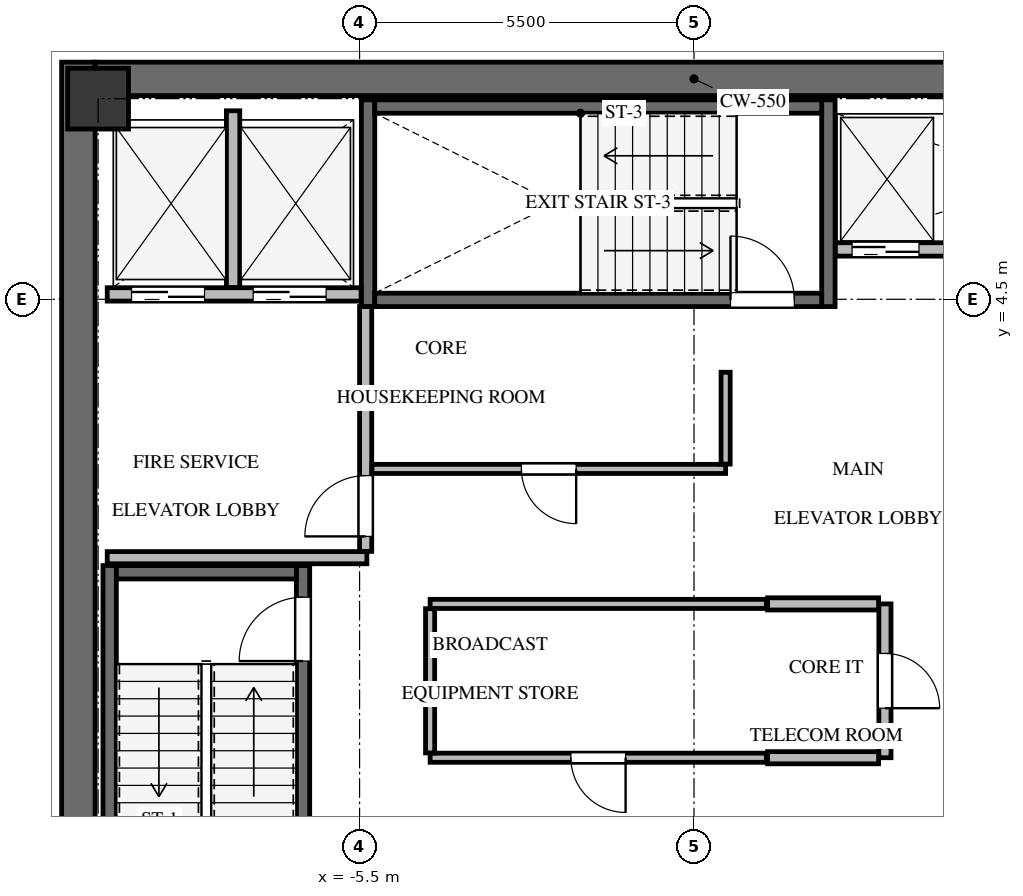
"""IFC4 building model, lengths in metres.
Left out: names, types, materials, properties, quantities, classifications, styles, units other than length and angle.
Written with IfcOpenShell. Run it as: python <this file> out.ifc"""

import sys

from ifc_helpers import new_model, si_unit, direction, frame, frame_2d, origin, origin_2d, place, context, subcontext, project, spatial, rectangle, extrude, source, transform, mapped, element, fill, save


model = new_model("IFC4")
c1 = context("Model", 3, precision=1e-05, world=origin(), true_north=direction((0.0, 1.0)))
c2 = subcontext(c1, "Body", "Model", "MODEL_VIEW")
j1 = project(units=[si_unit("LENGTHUNIT", "METRE"), si_unit("PLANEANGLEUNIT", "RADIAN")], contexts=[c1])
p1 = place(None, origin())
s1 = spatial("IfcSite", under=j1, at=p1, CompositionType="ELEMENT")
p2 = place(p1, origin())
s2 = spatial("IfcBuilding", under=s1, at=p2, CompositionType="ELEMENT")
p3 = place(p2, frame((0.0, 0.0, 238.1)))
s3 = spatial("IfcBuildingStorey", under=s2, at=p3, CompositionType="ELEMENT", Elevation=238.1)
p4 = place(p3, frame((-10.125, -8.4, 0.0), z_axis=(0.0, 0.0, 1.0), x_axis=(0.0, 1.0, 0.0)))
e1 = element("IfcWall", 1, at=p4, inside=s3, PredefinedType="SHEAR", context=c2, shape_type="SweptSolid", body=[
    extrude(rectangle(XDim=16.8, YDim=0.55, at=frame_2d((8.4, 0.0))), origin(), (0.0, 0.0, 1.0), 3.3),
])
p5 = place(p3, frame((-9.85, 8.125, 0.0), z_axis=(0.0, 0.0, 1.0), x_axis=(1.0, 0.0, 0.0)))
e2 = element("IfcWall", 2, at=p5, inside=s3, PredefinedType="SHEAR", context=c2, shape_type="SweptSolid", body=[
    extrude(rectangle(XDim=19.7, YDim=0.55, at=frame_2d((9.85, 0.0))), origin(), (0.0, 0.0, 1.0), 3.3),
])
p6 = place(p3, frame((-6.43, -7.77, -0.24), z_axis=(0.0, 0.0, 1.0), x_axis=(0.0, 1.0, 0.0)))
e3 = element("IfcWall", 3, at=p6, inside=s3, PredefinedType="SHEAR", context=c2, shape_type="SweptSolid", body=[
    extrude(rectangle(XDim=7.89, YDim=0.22, at=frame_2d((3.945, 0.0))), origin(), (0.0, 0.0, 1.0), 3.3),
])
p7 = place(p6, frame((6.32, 0.0, 0.0)))
e4 = element("IfcOpeningElement", 4, at=p7, cuts=e3, PredefinedType="OPENING", context=c2, shape_type="SweptSolid", body=[
    extrude(rectangle(XDim=1.05, YDim=2.15, at=frame_2d((0.525, 1.075))), frame((0.0, 0.12, 0.0), z_axis=(0.0, -1.0, 0.0), x_axis=(1.0, 0.0, 0.0)), (0.0, 0.0, 1.0), 0.24),
])
p8 = place(p3, frame((-9.61, 0.12, -0.24), z_axis=(0.0, 0.0, 1.0), x_axis=(0.0, -1.0, 0.0)))
e5 = element("IfcWall", 5, at=p8, inside=s3, PredefinedType="SHEAR", context=c2, shape_type="SweptSolid", body=[
    extrude(rectangle(XDim=7.89, YDim=0.22, at=frame_2d((3.945, 0.0))), origin(), (0.0, 0.0, 1.0), 3.3),
])
p9 = place(p3, frame((-6.54, 0.01, -0.24), z_axis=(0.0, 0.0, 1.0), x_axis=(-1.0, 0.0, 0.0)))
e6 = element("IfcWall", 6, at=p9, inside=s3, PredefinedType="SHEAR", context=c2, shape_type="SweptSolid", body=[
    extrude(rectangle(XDim=2.96, YDim=0.22, at=frame_2d((1.48, 0.0))), origin(), (0.0, 0.0, 1.0), 3.3),
])
for number, where, z_axis, x_axis in (
    (7, (2.21, 4.38, -0.24), (0.0, 0.0, 1.0), (0.0, 1.0, 0.0)),
    (8, (-5.36, 7.78, -0.24), (0.0, 0.0, 1.0), (0.0, -1.0, 0.0)),
):
    element("IfcWall", number, at=place(p3, frame(where, z_axis=z_axis, x_axis=x_axis)), inside=s3, PredefinedType="SHEAR", context=c2, shape_type="SweptSolid", body=[
        extrude(rectangle(XDim=3.4, YDim=0.22, at=frame_2d((1.7, 0.0))), origin(), (0.0, 0.0, 1.0), 3.3),
    ])
p10 = place(p3, frame((-5.25, 4.49, -0.24), z_axis=(0.0, 0.0, 1.0), x_axis=(1.0, 0.0, 0.0)))
e9 = element("IfcWall", 9, at=p10, inside=s3, PredefinedType="SHEAR", context=c2, shape_type="SweptSolid", body=[
    extrude(rectangle(XDim=7.35, YDim=0.22, at=frame_2d((3.675, 0.0))), origin(), (0.0, 0.0, 1.0), 3.3),
])
p11 = place(p10, frame((5.85, 0.0, 0.0)))
e10 = element("IfcOpeningElement", 10, at=p11, cuts=e9, PredefinedType="OPENING", context=c2, shape_type="SweptSolid", body=[
    extrude(rectangle(XDim=1.05, YDim=2.15, at=frame_2d((0.525, 1.075))), frame((0.0, 0.12, 0.0), z_axis=(0.0, -1.0, 0.0), x_axis=(1.0, 0.0, 0.0)), (0.0, 0.0, 1.0), 0.24),
])
p12 = place(p3, frame((2.1, 7.67, -0.24), z_axis=(0.0, 0.0, 1.0), x_axis=(-1.0, 0.0, 0.0)))
e11 = element("IfcWall", 11, at=p12, inside=s3, PredefinedType="SHEAR", context=c2, shape_type="SweptSolid", body=[
    extrude(rectangle(XDim=7.35, YDim=0.22, at=frame_2d((3.675, 0.0))), origin(), (0.0, 0.0, 1.0), 3.3),
])
m1 = source(origin(), c2, "Body", "SweptSolid", [
    extrude(rectangle(XDim=1.0, YDim=1.0, at=origin_2d()), origin(), (0.0, 0.0, 1.0), 3.3),
])
p13 = place(p3, frame((-9.8, 7.8, -0.24), z_axis=(0.0, 0.0, 1.0), x_axis=(1.0, 0.0, 0.0)))
e12 = element("IfcColumn", 12, at=p13, inside=s3, PredefinedType="COLUMN", context=c2, shape_type="MappedRepresentation", body=[
    mapped(m1, transform((0.0, 0.0, 0.0), x_axis=(1.0, 0.0, 0.0), y_axis=(0.0, 1.0, 0.0), z_axis=(0.0, 0.0, 1.0), scale=1.0)),
])
p14 = place(p3, frame((-9.65, 4.58, 0.0), z_axis=(0.0, 0.0, 1.0), x_axis=(1.0, 0.0, 0.0)))
e13 = element("IfcWall", 13, at=p14, inside=s3, PredefinedType="SOLIDWALL", context=c2, shape_type="SweptSolid", body=[
    extrude(rectangle(XDim=4.175, YDim=0.22, at=frame_2d((2.087, 0.0))), origin(), (0.0, 0.0, 1.0), 3.045),
])
p15 = place(p14, frame((0.4, 0.0, 0.0)))
e14 = element("IfcOpeningElement", 14, at=p15, cuts=e13, PredefinedType="OPENING", context=c2, shape_type="SweptSolid", body=[
    extrude(rectangle(XDim=1.2, YDim=2.15, at=frame_2d((0.6, 1.075))), frame((0.0, 0.12, 0.0), z_axis=(0.0, -1.0, 0.0), x_axis=(1.0, 0.0, 0.0)), (0.0, 0.0, 1.0), 0.24),
])
p16 = place(p14, frame((2.4, 0.0, 0.0)))
e15 = element("IfcOpeningElement", 15, at=p16, cuts=e13, PredefinedType="OPENING", context=c2, shape_type="SweptSolid", body=[
    extrude(rectangle(XDim=1.2, YDim=2.15, at=frame_2d((0.6, 1.075))), frame((0.0, 0.12, 0.0), z_axis=(0.0, -1.0, 0.0), x_axis=(1.0, 0.0, 0.0)), (0.0, 0.0, 1.0), 0.24),
])
p17 = place(p3, frame((-7.58, 4.694, 0.0), z_axis=(0.0, 0.0, 1.0), x_axis=(0.0, 1.0, 0.0)))
e16 = element("IfcWall", 16, at=p17, inside=s3, PredefinedType="SOLIDWALL", context=c2, shape_type="SweptSolid", body=[
    extrude(rectangle(XDim=2.906, YDim=0.22, at=frame_2d((1.453, 0.0))), origin(), (0.0, 0.0, 1.0), 3.045),
])
p18 = place(p3, frame((-9.65, 0.25, 0.0), z_axis=(0.0, 0.0, 1.0), x_axis=(1.0, 0.0, 0.0)))
e17 = element("IfcWall", 17, at=p18, inside=s3, PredefinedType="SOLIDWALL", context=c2, shape_type="SweptSolid", body=[
    extrude(rectangle(XDim=4.27, YDim=0.2, at=frame_2d((2.135, 0.0))), origin(), (0.0, 0.0, 1.0), 3.045),
])
p19 = place(p3, frame((-5.4, 0.354, 0.0), z_axis=(0.0, 0.0, 1.0), x_axis=(0.0, 1.0, 0.0)))
e18 = element("IfcWall", 18, at=p19, inside=s3, PredefinedType="SOLIDWALL", context=c2, shape_type="SweptSolid", body=[
    extrude(rectangle(XDim=4.026, YDim=0.2, at=frame_2d((2.013, 0.0))), origin(), (0.0, 0.0, 1.0), 3.045),
])
p20 = place(p19, frame((0.246, 0.0, 0.0)))
e19 = element("IfcOpeningElement", 19, at=p20, cuts=e18, PredefinedType="OPENING", context=c2, shape_type="SweptSolid", body=[
    extrude(rectangle(XDim=1.0, YDim=2.15, at=frame_2d((0.5, 1.075))), frame((0.0, 0.11, 0.0), z_axis=(0.0, -1.0, 0.0), x_axis=(1.0, 0.0, 0.0)), (0.0, 0.0, 1.0), 0.22),
])
p21 = place(p3, frame((2.325, 5.32, 0.0), z_axis=(0.0, 0.0, 1.0), x_axis=(1.0, 0.0, 0.0)))
e20 = element("IfcWall", 20, at=p21, inside=s3, PredefinedType="SOLIDWALL", context=c2, shape_type="SweptSolid", body=[
    extrude(rectangle(XDim=7.325, YDim=0.22, at=frame_2d((3.663, 0.0))), origin(), (0.0, 0.0, 1.0), 3.045),
])
p22 = place(p21, frame((0.275, 0.0, 0.0)))
e21 = element("IfcOpeningElement", 21, at=p22, cuts=e20, PredefinedType="OPENING", context=c2, shape_type="SweptSolid", body=[
    extrude(rectangle(XDim=1.1, YDim=2.15, at=frame_2d((0.55, 1.075))), frame((0.0, 0.12, 0.0), z_axis=(0.0, -1.0, 0.0), x_axis=(1.0, 0.0, 0.0)), (0.0, 0.0, 1.0), 0.24),
])
p23 = place(p21, frame((2.045, 0.0, 0.0)))
e22 = element("IfcOpeningElement", 22, at=p23, cuts=e20, PredefinedType="OPENING", context=c2, shape_type="SweptSolid", body=[
    extrude(rectangle(XDim=1.1, YDim=2.15, at=frame_2d((0.55, 1.075))), frame((0.0, 0.12, 0.0), z_axis=(0.0, -1.0, 0.0), x_axis=(1.0, 0.0, 0.0)), (0.0, 0.0, 1.0), 0.24),
])
p24 = place(p21, frame((3.815, 0.0, 0.0)))
e23 = element("IfcOpeningElement", 23, at=p24, cuts=e20, PredefinedType="OPENING", context=c2, shape_type="SweptSolid", body=[
    extrude(rectangle(XDim=1.1, YDim=2.15, at=frame_2d((0.55, 1.075))), frame((0.0, 0.12, 0.0), z_axis=(0.0, -1.0, 0.0), x_axis=(1.0, 0.0, 0.0)), (0.0, 0.0, 1.0), 0.24),
])
p25 = place(p21, frame((5.585, 0.0, 0.0)))
e24 = element("IfcOpeningElement", 24, at=p25, cuts=e20, PredefinedType="OPENING", context=c2, shape_type="SweptSolid", body=[
    extrude(rectangle(XDim=1.1, YDim=2.15, at=frame_2d((0.55, 1.075))), frame((0.0, 0.12, 0.0), z_axis=(0.0, -1.0, 0.0), x_axis=(1.0, 0.0, 0.0)), (0.0, 0.0, 1.0), 0.24),
])
p26 = place(p3, frame((1.19, -3.04, 0.0), z_axis=(0.0, 0.0, 1.0), x_axis=(-1.0, 0.0, 0.0)))
e25 = element("IfcWall", 25, at=p26, inside=s3, PredefinedType="PARTITIONING", context=c2, shape_type="SweptSolid", body=[
    extrude(rectangle(XDim=5.53, YDim=0.15, at=frame_2d((2.765, 0.0))), origin(), (0.0, 0.0, 1.0), 3.045),
])
p27 = place(p26, frame((2.315, 0.0, 0.0)))
e26 = element("IfcOpeningElement", 26, at=p27, cuts=e25, PredefinedType="OPENING", context=c2, shape_type="SweptSolid", body=[
    extrude(rectangle(XDim=0.9, YDim=2.05, at=frame_2d((0.45, 1.025))), frame((0.0, 0.085, 0.0), z_axis=(0.0, -1.0, 0.0), x_axis=(1.0, 0.0, 0.0)), (0.0, 0.0, 1.0), 0.17),
])
p28 = place(p3, frame((-4.34, -0.51, 0.0), z_axis=(0.0, 0.0, 1.0), x_axis=(1.0, 0.0, 0.0)))
e27 = element("IfcWall", 27, at=p28, inside=s3, PredefinedType="PARTITIONING", context=c2, shape_type="SweptSolid", body=[
    extrude(rectangle(XDim=5.53, YDim=0.15, at=frame_2d((2.765, 0.0))), origin(), (0.0, 0.0, 1.0), 3.045),
])
p29 = place(p3, frame((-4.34, -2.961, 0.0), z_axis=(0.0, 0.0, 1.0), x_axis=(0.0, 1.0, 0.0)))
e28 = element("IfcWall", 28, at=p29, inside=s3, PredefinedType="PARTITIONING", context=c2, shape_type="SweptSolid", body=[
    extrude(rectangle(XDim=2.372, YDim=0.15, at=frame_2d((1.186, 0.0))), origin(), (0.0, 0.0, 1.0), 3.045),
])
p30 = place(p3, frame((3.14, -0.51, 0.0), z_axis=(0.0, 0.0, 1.0), x_axis=(0.0, -1.0, 0.0)))
e29 = element("IfcWall", 29, at=p30, inside=s3, PredefinedType="SOLIDWALL", context=c2, shape_type="SweptSolid", body=[
    extrude(rectangle(XDim=2.53, YDim=0.2, at=frame_2d((1.265, 0.0))), origin(), (0.0, 0.0, 1.0), 3.045),
])
p31 = place(p30, frame((0.815, 0.0, 0.0)))
e30 = element("IfcOpeningElement", 30, at=p31, cuts=e29, PredefinedType="OPENING", context=c2, shape_type="SweptSolid", body=[
    extrude(rectangle(XDim=0.9, YDim=2.05, at=frame_2d((0.45, 1.025))), frame((0.0, 0.11, 0.0), z_axis=(0.0, -1.0, 0.0), x_axis=(1.0, 0.0, 0.0)), (0.0, 0.0, 1.0), 0.22),
])
for number, where, z_axis, x_axis in (
    (31, (3.036, -3.04, 0.0), (0.0, 0.0, 1.0), (-1.0, 0.0, 0.0)),
    (32, (1.21, -0.51, 0.0), (0.0, 0.0, 1.0), (1.0, 0.0, 0.0)),
):
    element("IfcWall", number, at=place(p3, frame(where, z_axis=z_axis, x_axis=x_axis)), inside=s3, PredefinedType="SOLIDWALL", context=c2, shape_type="SweptSolid", body=[
        extrude(rectangle(XDim=1.826, YDim=0.2, at=frame_2d((0.913, 0.0))), origin(), (0.0, 0.0, 1.0), 3.045),
    ])
p32 = place(p3, frame((0.52, 1.71, 0.0), z_axis=(0.0, 0.0, 1.0), x_axis=(-1.0, 0.0, 0.0)))
e33 = element("IfcWall", 33, at=p32, inside=s3, PredefinedType="PARTITIONING", context=c2, shape_type="SweptSolid", body=[
    extrude(rectangle(XDim=5.816, YDim=0.15, at=frame_2d((2.908, 0.0))), origin(), (0.0, 0.0, 1.0), 3.045),
])
p33 = place(p32, frame((2.458, 0.0, 0.0)))
e34 = element("IfcOpeningElement", 34, at=p33, cuts=e33, PredefinedType="OPENING", context=c2, shape_type="SweptSolid", body=[
    extrude(rectangle(XDim=0.9, YDim=2.05, at=frame_2d((0.45, 1.025))), frame((0.0, 0.085, 0.0), z_axis=(0.0, -1.0, 0.0), x_axis=(1.0, 0.0, 0.0)), (0.0, 0.0, 1.0), 0.17),
])
p34 = place(p3, frame((0.52, 3.3, 0.0), z_axis=(0.0, 0.0, 1.0), x_axis=(0.0, -1.0, 0.0)))
e35 = element("IfcWall", 35, at=p34, inside=s3, PredefinedType="PARTITIONING", context=c2, shape_type="SweptSolid", body=[
    extrude(rectangle(XDim=1.511, YDim=0.15, at=frame_2d((0.755, 0.0))), origin(), (0.0, 0.0, 1.0), 3.045),
])
m2 = source(origin(), c2, "Body", "SweptSolid", [
    extrude(rectangle(XDim=1.05, YDim=2.15, at=frame_2d((0.525, 1.075))), frame((0.0, 0.025, 0.0), z_axis=(0.0, -1.0, 0.0), x_axis=(1.0, 0.0, 0.0)), (0.0, 0.0, 1.0), 0.05),
])
p35 = place(p7, origin())
e36 = element("IfcDoor", 36, at=p35, inside=s3, OperationType="SINGLE_SWING_LEFT", PredefinedType="DOOR", context=c2, shape_type="MappedRepresentation", body=[
    mapped(m2, transform((0.0, 0.0, 0.0), x_axis=(1.0, 0.0, 0.0), y_axis=(0.0, 1.0, 0.0), z_axis=(0.0, 0.0, 1.0), scale=1.0)),
])
fill(e4, e36)
p36 = place(p11, origin())
e37 = element("IfcDoor", 37, at=p36, inside=s3, OperationType="SINGLE_SWING_LEFT", PredefinedType="DOOR", context=c2, shape_type="MappedRepresentation", body=[
    mapped(m2, transform((0.0, 0.0, 0.0), x_axis=(1.0, 0.0, 0.0), y_axis=(0.0, 1.0, 0.0), z_axis=(0.0, 0.0, 1.0), scale=1.0)),
])
fill(e10, e37)
m3 = source(origin(), c2, "Body", "SweptSolid", [
    extrude(rectangle(XDim=1.2, YDim=2.15, at=frame_2d((0.6, 1.075))), frame((0.0, 0.025, 0.0), z_axis=(0.0, -1.0, 0.0), x_axis=(1.0, 0.0, 0.0)), (0.0, 0.0, 1.0), 0.05),
])
p37 = place(p15, origin())
e38 = element("IfcDoor", 38, at=p37, inside=s3, OperationType="DOUBLE_DOOR_SLIDING", PredefinedType="DOOR", context=c2, shape_type="MappedRepresentation", body=[
    mapped(m3, transform((0.0, 0.0, 0.0), x_axis=(1.0, 0.0, 0.0), y_axis=(0.0, 1.0, 0.0), z_axis=(0.0, 0.0, 1.0), scale=1.0)),
])
fill(e14, e38)
p38 = place(p16, origin())
e39 = element("IfcDoor", 39, at=p38, inside=s3, OperationType="DOUBLE_DOOR_SLIDING", PredefinedType="DOOR", context=c2, shape_type="MappedRepresentation", body=[
    mapped(m3, transform((0.0, 0.0, 0.0), x_axis=(1.0, 0.0, 0.0), y_axis=(0.0, 1.0, 0.0), z_axis=(0.0, 0.0, 1.0), scale=1.0)),
])
fill(e15, e39)
m4 = source(origin(), c2, "Body", "SweptSolid", [
    extrude(rectangle(XDim=1.0, YDim=2.15, at=frame_2d((0.5, 1.075))), frame((0.0, 0.025, 0.0), z_axis=(0.0, -1.0, 0.0), x_axis=(1.0, 0.0, 0.0)), (0.0, 0.0, 1.0), 0.05),
])
p39 = place(p20, origin())
e40 = element("IfcDoor", 40, at=p39, inside=s3, OperationType="SINGLE_SWING_LEFT", PredefinedType="DOOR", context=c2, shape_type="MappedRepresentation", body=[
    mapped(m4, transform((0.0, 0.0, 0.0), x_axis=(1.0, 0.0, 0.0), y_axis=(0.0, 1.0, 0.0), z_axis=(0.0, 0.0, 1.0), scale=1.0)),
])
fill(e19, e40)
m5 = source(origin(), c2, "Body", "SweptSolid", [
    extrude(rectangle(XDim=1.1, YDim=2.15, at=frame_2d((0.55, 1.075))), frame((0.0, 0.025, 0.0), z_axis=(0.0, -1.0, 0.0), x_axis=(1.0, 0.0, 0.0)), (0.0, 0.0, 1.0), 0.05),
])
p40 = place(p22, origin())
e41 = element("IfcDoor", 41, at=p40, inside=s3, OperationType="DOUBLE_DOOR_SLIDING", PredefinedType="DOOR", context=c2, shape_type="MappedRepresentation", body=[
    mapped(m5, transform((0.0, 0.0, 0.0), x_axis=(1.0, 0.0, 0.0), y_axis=(0.0, 1.0, 0.0), z_axis=(0.0, 0.0, 1.0), scale=1.0)),
])
fill(e21, e41)
m6 = source(origin(), c2, "Body", "SweptSolid", [
    extrude(rectangle(XDim=0.9, YDim=2.05, at=frame_2d((0.45, 1.025))), frame((0.0, 0.025, 0.0), z_axis=(0.0, -1.0, 0.0), x_axis=(1.0, 0.0, 0.0)), (0.0, 0.0, 1.0), 0.05),
])
p41 = place(p27, origin())
e42 = element("IfcDoor", 42, at=p41, inside=s3, OperationType="SINGLE_SWING_LEFT", PredefinedType="DOOR", context=c2, shape_type="MappedRepresentation", body=[
    mapped(m6, transform((0.0, 0.0, 0.0), x_axis=(1.0, 0.0, 0.0), y_axis=(0.0, 1.0, 0.0), z_axis=(0.0, 0.0, 1.0), scale=1.0)),
])
fill(e26, e42)
m7 = source(origin(), c2, "Body", "SweptSolid", [
    extrude(rectangle(XDim=0.9, YDim=2.05, at=frame_2d((0.45, 1.025))), frame((0.0, 0.025, 0.0), z_axis=(0.0, -1.0, 0.0), x_axis=(1.0, 0.0, 0.0)), (0.0, 0.0, 1.0), 0.05),
])
p42 = place(p31, origin())
e43 = element("IfcDoor", 43, at=p42, inside=s3, OperationType="SINGLE_SWING_RIGHT", PredefinedType="DOOR", context=c2, shape_type="MappedRepresentation", body=[
    mapped(m7, transform((0.0, 0.0, 0.0), x_axis=(1.0, 0.0, 0.0), y_axis=(0.0, 1.0, 0.0), z_axis=(0.0, 0.0, 1.0), scale=1.0)),
])
fill(e30, e43)
p43 = place(p33, origin())
e44 = element("IfcDoor", 44, at=p43, inside=s3, OperationType="SINGLE_SWING_LEFT", PredefinedType="DOOR", context=c2, shape_type="MappedRepresentation", body=[
    mapped(m6, transform((0.0, 0.0, 0.0), x_axis=(1.0, 0.0, 0.0), y_axis=(0.0, 1.0, 0.0), z_axis=(0.0, 0.0, 1.0), scale=1.0)),
])
fill(e34, e44)
save(model, sys.argv[1])
